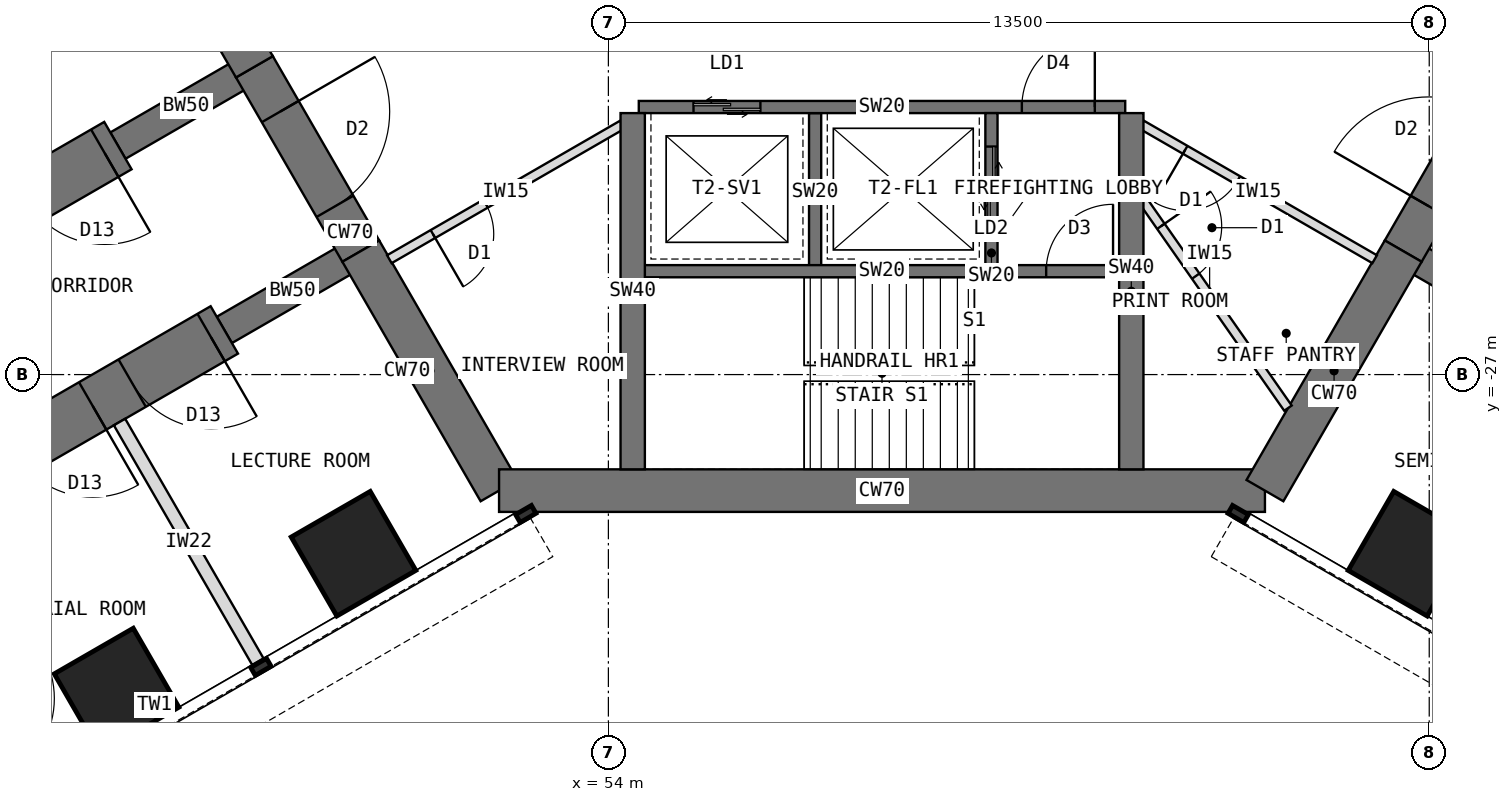
"""IFC4 building model, lengths in metres.
Left out: names, types, materials, properties, quantities, classifications, styles, units other than length and angle.
Written with IfcOpenShell. Run it as: python <this file> out.ifc"""

import sys

from ifc_helpers import new_model, si_unit, direction, frame, frame_2d, origin, origin_2d, place, context, subcontext, project, spatial, rectangle, extrude, element, fill, save


model = new_model("IFC4")
c1 = context("Model", 3, precision=1e-05, world=origin(), true_north=direction((0.0, 1.0)))
c2 = subcontext(c1, "Body", "Model", "MODEL_VIEW")
j1 = project(units=[si_unit("LENGTHUNIT", "METRE"), si_unit("PLANEANGLEUNIT", "RADIAN")], contexts=[c1])
p1 = place(None, origin())
s1 = spatial("IfcSite", under=j1, at=p1, CompositionType="ELEMENT")
p2 = place(p1, origin())
s2 = spatial("IfcBuilding", under=s1, at=p2, CompositionType="ELEMENT")
p3 = place(p2, frame((0.0, 0.0, 36.5)))
s3 = spatial("IfcBuildingStorey", under=s2, at=p3, CompositionType="ELEMENT", Elevation=36.5)
p4 = place(p3, frame((45.904, -18.0, 0.0), z_axis=(0.0, 0.0, 1.0), x_axis=(0.500024481964, -0.866011268655, 0.0)))
e1 = element("IfcWall", 1, at=p4, inside=s3, PredefinedType="SHEAR", context=c2, shape_type="SweptSolid", body=[
    extrude(rectangle(XDim=4.548, YDim=0.7, at=frame_2d((2.274, 0.0))), origin(), (0.0, 0.0, 1.0), 4.0),
])
p5 = place(p3, frame((48.178, -21.939, 0.0), z_axis=(0.0, 0.0, 1.0), x_axis=(0.500010275428, -0.866019471182, 0.0)))
e2 = element("IfcWall", 2, at=p5, inside=s3, PredefinedType="SHEAR", context=c2, shape_type="SweptSolid", body=[
    extrude(rectangle(XDim=3.5, YDim=0.7, at=frame_2d((1.75, 0.0))), origin(), (0.0, 0.0, 1.0), 4.0),
])
p6 = place(p5, frame((0.85, 0.0, 0.0)))
e3 = element("IfcOpeningElement", 3, at=p6, cuts=e2, PredefinedType="OPENING", context=c2, shape_type="SweptSolid", body=[
    extrude(rectangle(XDim=1.8, YDim=2.1, at=frame_2d((0.9, 1.05))), frame((0.0, 0.36, 0.0), z_axis=(0.0, -1.0, 0.0), x_axis=(1.0, 0.0, 0.0)), (0.0, 0.0, 1.0), 0.72),
])
p7 = place(p3, frame((49.928, -24.97, 0.0), z_axis=(0.0, 0.0, 1.0), x_axis=(0.499984222037, -0.866034513004, 0.0)))
e4 = element("IfcWall", 4, at=p7, inside=s3, PredefinedType="SHEAR", context=c2, shape_type="SweptSolid", body=[
    extrude(rectangle(XDim=4.548, YDim=0.7, at=frame_2d((2.274, 0.0))), origin(), (0.0, 0.0, 1.0), 4.0),
])
p8 = place(p3, frame((52.202, -28.908, 0.0), z_axis=(0.0, 0.0, 1.0), x_axis=(1.0, 0.0, 0.0)))
e5 = element("IfcWall", 5, at=p8, inside=s3, PredefinedType="SHEAR", context=c2, shape_type="SweptSolid", body=[
    extrude(rectangle(XDim=12.596, YDim=0.7, at=frame_2d((6.298, 0.0))), origin(), (0.0, 0.0, 1.0), 4.0),
])
p9 = place(p3, frame((64.798, -28.908, 0.0), z_axis=(0.0, 0.0, 1.0), x_axis=(0.499984222037, 0.866034513004, 0.0)))
e6 = element("IfcWall", 6, at=p9, inside=s3, PredefinedType="SHEAR", context=c2, shape_type="SweptSolid", body=[
    extrude(rectangle(XDim=4.548, YDim=0.7, at=frame_2d((2.274, 0.0))), origin(), (0.0, 0.0, 1.0), 4.0),
])
p10 = place(p3, frame((67.072, -24.97, 0.0), z_axis=(0.0, 0.0, 1.0), x_axis=(0.500010275428, 0.866019471182, 0.0)))
e7 = element("IfcWall", 7, at=p10, inside=s3, PredefinedType="SHEAR", context=c2, shape_type="SweptSolid", body=[
    extrude(rectangle(XDim=3.5, YDim=0.7, at=frame_2d((1.75, 0.0))), origin(), (0.0, 0.0, 1.0), 4.0),
])
p11 = place(p10, frame((0.85, 0.0, 0.0)))
e8 = element("IfcOpeningElement", 8, at=p11, cuts=e7, PredefinedType="OPENING", context=c2, shape_type="SweptSolid", body=[
    extrude(rectangle(XDim=1.8, YDim=2.1, at=frame_2d((0.9, 1.05))), frame((0.0, 0.36, 0.0), z_axis=(0.0, -1.0, 0.0), x_axis=(1.0, 0.0, 0.0)), (0.0, 0.0, 1.0), 0.72),
])
p12 = place(p3, frame((49.928, -24.97, 0.0), z_axis=(0.0, 0.0, 1.0), x_axis=(-0.866031863473, -0.499988811324, 0.0)))
e9 = element("IfcWall", 9, at=p12, inside=s3, PredefinedType="SHEAR", context=c2, shape_type="SweptSolid", body=[
    extrude(rectangle(XDim=2.592, YDim=0.5, at=frame_2d((1.296, 0.0))), origin(), (0.0, 0.0, 1.0), 4.0),
])
p13 = place(p3, frame((47.684, -26.266, 0.0), z_axis=(0.0, 0.0, 1.0), x_axis=(-0.866027579429, -0.499996231654, 0.0)))
e10 = element("IfcWall", 10, at=p13, inside=s3, PredefinedType="SHEAR", context=c2, shape_type="SweptSolid", body=[
    extrude(rectangle(XDim=13.2, YDim=0.9, at=frame_2d((6.6, 0.0))), origin(), (0.0, 0.0, 1.0), 4.0),
])
p14 = place(p13, frame((0.25, 0.0, 0.0)))
e11 = element("IfcOpeningElement", 11, at=p14, cuts=e10, PredefinedType="OPENING", context=c2, shape_type="SweptSolid", body=[
    extrude(rectangle(XDim=1.5, YDim=2.1, at=frame_2d((0.75, 1.05))), frame((0.0, 0.46, 0.0), z_axis=(0.0, -1.0, 0.0), x_axis=(1.0, 0.0, 0.0)), (0.0, 0.0, 1.0), 0.92),
])
p15 = place(p13, frame((2.5, 0.0, 0.0)))
e12 = element("IfcOpeningElement", 12, at=p15, cuts=e10, PredefinedType="OPENING", context=c2, shape_type="SweptSolid", body=[
    extrude(rectangle(XDim=1.5, YDim=2.1, at=frame_2d((0.75, 1.05))), frame((0.0, 0.46, 0.0), z_axis=(0.0, -1.0, 0.0), x_axis=(1.0, 0.0, 0.0)), (0.0, 0.0, 1.0), 0.92),
])
p16 = place(p3, frame((48.178, -21.939, 0.0), z_axis=(0.0, 0.0, 1.0), x_axis=(-0.866072649678, -0.499918158782, 0.0)))
e13 = element("IfcWall", 13, at=p16, inside=s3, PredefinedType="SHEAR", context=c2, shape_type="SweptSolid", body=[
    extrude(rectangle(XDim=2.592, YDim=0.5, at=frame_2d((1.296, 0.0))), origin(), (0.0, 0.0, 1.0), 4.0),
])
p17 = place(p3, frame((45.934, -23.234, 0.0), z_axis=(0.0, 0.0, 1.0), x_axis=(-0.866019570528, -0.500010103361, 0.0)))
e14 = element("IfcWall", 14, at=p17, inside=s3, PredefinedType="SHEAR", context=c2, shape_type="SweptSolid", body=[
    extrude(rectangle(XDim=13.2, YDim=0.9, at=frame_2d((6.6, 0.0))), origin(), (0.0, 0.0, 1.0), 4.0),
])
p18 = place(p17, frame((0.25, 0.0, 0.0)))
e15 = element("IfcOpeningElement", 15, at=p18, cuts=e14, PredefinedType="OPENING", context=c2, shape_type="SweptSolid", body=[
    extrude(rectangle(XDim=1.5, YDim=2.1, at=frame_2d((0.75, 1.05))), frame((0.0, 0.46, 0.0), z_axis=(0.0, -1.0, 0.0), x_axis=(1.0, 0.0, 0.0)), (0.0, 0.0, 1.0), 0.92),
])
p19 = place(p17, frame((2.5, 0.0, 0.0)))
e16 = element("IfcOpeningElement", 16, at=p19, cuts=e14, PredefinedType="OPENING", context=c2, shape_type="SweptSolid", body=[
    extrude(rectangle(XDim=1.5, YDim=2.1, at=frame_2d((0.75, 1.05))), frame((0.0, 0.46, 0.0), z_axis=(0.0, -1.0, 0.0), x_axis=(1.0, 0.0, 0.0)), (0.0, 0.0, 1.0), 0.92),
])
p20 = place(p3, frame((67.072, -24.97, 0.0), z_axis=(0.0, 0.0, 1.0), x_axis=(0.866031863473, -0.499988811324, 0.0)))
e17 = element("IfcWall", 17, at=p20, inside=s3, PredefinedType="SHEAR", context=c2, shape_type="SweptSolid", body=[
    extrude(rectangle(XDim=2.592, YDim=0.5, at=frame_2d((1.296, 0.0))), origin(), (0.0, 0.0, 1.0), 4.0),
])
for number, where, z_axis, x_axis in (
    (18, (49.809, -29.946, 0.0), (0.0, 0.0, 1.0), (0.866, 0.5, 0.0)),
    (19, (45.912, -32.196, 0.0), (0.0, 0.0, 1.0), (0.866, 0.5, 0.0)),
    (20, (67.191, -29.946, 0.0), (0.0, 0.0, 1.0), (0.5, 0.866, 0.0)),
):
    element("IfcColumn", number, at=place(p3, frame(where, z_axis=z_axis, x_axis=x_axis)), inside=s3, PredefinedType="COLUMN", context=c2, shape_type="SweptSolid", body=[
        extrude(rectangle(XDim=1.5, YDim=1.5, at=origin_2d()), origin(), (0.0, 0.0, 1.0), 4.0),
    ])
p21 = place(p3, frame((54.5, -22.6, 0.0), z_axis=(0.0, 0.0, 1.0), x_axis=(1.0, 0.0, 0.0)))
e21 = element("IfcWall", 21, at=p21, inside=s3, PredefinedType="SHEAR", context=c2, shape_type="SweptSolid", body=[
    extrude(rectangle(XDim=8.0, YDim=0.2, at=frame_2d((4.0, 0.0))), origin(), (0.0, 0.0, 1.0), 4.0),
])
p22 = place(p21, frame((6.3, 0.0, 0.0)))
e22 = element("IfcOpeningElement", 22, at=p22, cuts=e21, PredefinedType="OPENING", context=c2, shape_type="SweptSolid", body=[
    extrude(rectangle(XDim=1.2, YDim=2.1, at=frame_2d((0.6, 1.05))), frame((0.0, 0.11, 0.0), z_axis=(0.0, -1.0, 0.0), x_axis=(1.0, 0.0, 0.0)), (0.0, 0.0, 1.0), 0.22),
])
p23 = place(p21, frame((0.9, 0.0, 0.0)))
e23 = element("IfcOpeningElement", 23, at=p23, cuts=e21, PredefinedType="OPENING", context=c2, shape_type="SweptSolid", body=[
    extrude(rectangle(XDim=1.1, YDim=2.2, at=frame_2d((0.55, 1.1))), frame((0.0, 0.11, 0.0), z_axis=(0.0, -1.0, 0.0), x_axis=(1.0, 0.0, 0.0)), (0.0, 0.0, 1.0), 0.22),
])
p24 = place(p3, frame((57.4, -22.7, 0.0), z_axis=(0.0, 0.0, 1.0), x_axis=(0.0, -1.0, 0.0)))
e24 = element("IfcWall", 24, at=p24, inside=s3, PredefinedType="SHEAR", context=c2, shape_type="SweptSolid", body=[
    extrude(rectangle(XDim=2.6, YDim=0.2, at=frame_2d((1.3, 0.0))), origin(), (0.0, 0.0, 1.0), 4.0),
])
p25 = place(p3, frame((60.3, -22.7, 0.0), z_axis=(0.0, 0.0, 1.0), x_axis=(0.0, -1.0, 0.0)))
e25 = element("IfcWall", 25, at=p25, inside=s3, PredefinedType="SHEAR", context=c2, shape_type="SweptSolid", body=[
    extrude(rectangle(XDim=2.6, YDim=0.2, at=frame_2d((1.3, 0.0))), origin(), (0.0, 0.0, 1.0), 4.0),
])
p26 = place(p25, frame((0.55, 0.0, 0.0)))
e26 = element("IfcOpeningElement", 26, at=p26, cuts=e25, PredefinedType="OPENING", context=c2, shape_type="SweptSolid", body=[
    extrude(rectangle(XDim=1.3, YDim=2.2, at=frame_2d((0.65, 1.1))), frame((0.0, 0.11, 0.0), z_axis=(0.0, -1.0, 0.0), x_axis=(1.0, 0.0, 0.0)), (0.0, 0.0, 1.0), 0.22),
])
p27 = place(p3, frame((54.5, -25.3, 0.0), z_axis=(0.0, 0.0, 1.0), x_axis=(1.0, 0.0, 0.0)))
e27 = element("IfcWall", 27, at=p27, inside=s3, PredefinedType="SHEAR", context=c2, shape_type="SweptSolid", body=[
    extrude(rectangle(XDim=8.0, YDim=0.2, at=frame_2d((4.0, 0.0))), origin(), (0.0, 0.0, 1.0), 4.0),
])
p28 = place(p27, frame((6.7, 0.0, 0.0)))
e28 = element("IfcOpeningElement", 28, at=p28, cuts=e27, PredefinedType="OPENING", context=c2, shape_type="SweptSolid", body=[
    extrude(rectangle(XDim=1.1, YDim=2.1, at=frame_2d((0.55, 1.05))), frame((0.0, 0.11, 0.0), z_axis=(0.0, -1.0, 0.0), x_axis=(1.0, 0.0, 0.0)), (0.0, 0.0, 1.0), 0.22),
])
for number, where, z_axis, x_axis in (
    (29, (62.6, -22.7, 0.0), (0.0, 0.0, 1.0), (0.0, -1.0, 0.0)),
    (30, (54.4, -22.7, 0.0), (0.0, 0.0, 1.0), (0.0, -1.0, 0.0)),
):
    element("IfcWall", number, at=place(p3, frame(where, z_axis=z_axis, x_axis=x_axis)), inside=s3, PredefinedType="SHEAR", context=c2, shape_type="SweptSolid", body=[
        extrude(rectangle(XDim=5.858, YDim=0.4, at=frame_2d((2.929, 0.0))), origin(), (0.0, 0.0, 1.0), 4.0),
    ])
p29 = place(p3, frame((45.96, -27.78, 0.0), z_axis=(0.0, 0.0, 1.0), x_axis=(0.499982560684, -0.866035472144, 0.0)))
e31 = element("IfcWall", 31, at=p29, inside=s3, PredefinedType="PARTITIONING", context=c2, shape_type="SweptSolid", body=[
    extrude(rectangle(XDim=4.55, YDim=0.215, at=frame_2d((2.275, 0.0))), origin(), (0.0, 0.0, 1.0), 3.8),
])
p30 = place(p3, frame((66.603, -25.103, 0.0), z_axis=(0.0, 0.0, 1.0), x_axis=(-0.866021148949, 0.500007369519, 0.0)))
e32 = element("IfcWall", 32, at=p30, inside=s3, PredefinedType="PARTITIONING", context=c2, shape_type="SweptSolid", body=[
    extrude(rectangle(XDim=4.426, YDim=0.15, at=frame_2d((2.213, 0.0))), origin(), (0.0, 0.0, 1.0), 3.8),
])
p31 = place(p30, frame((2.598, 0.0, 0.0)))
e33 = element("IfcOpeningElement", 33, at=p31, cuts=e32, PredefinedType="OPENING", context=c2, shape_type="SweptSolid", body=[
    extrude(rectangle(XDim=1.0, YDim=2.1, at=frame_2d((0.5, 1.05))), frame((0.0, 0.085, 0.0), z_axis=(0.0, -1.0, 0.0), x_axis=(1.0, 0.0, 0.0)), (0.0, 0.0, 1.0), 0.17),
])
p32 = place(p3, frame((54.23, -22.89, 0.0), z_axis=(0.0, 0.0, 1.0), x_axis=(-0.866021148949, -0.500007369519, 0.0)))
e34 = element("IfcWall", 34, at=p32, inside=s3, PredefinedType="PARTITIONING", context=c2, shape_type="SweptSolid", body=[
    extrude(rectangle(XDim=4.426, YDim=0.15, at=frame_2d((2.213, 0.0))), origin(), (0.0, 0.0, 1.0), 3.8),
])
p33 = place(p32, frame((2.598, 0.0, 0.0)))
e35 = element("IfcOpeningElement", 35, at=p33, cuts=e34, PredefinedType="OPENING", context=c2, shape_type="SweptSolid", body=[
    extrude(rectangle(XDim=1.0, YDim=2.1, at=frame_2d((0.5, 1.05))), frame((0.0, 0.085, 0.0), z_axis=(0.0, -1.0, 0.0), x_axis=(1.0, 0.0, 0.0)), (0.0, 0.0, 1.0), 0.17),
])
p34 = place(p3, frame((62.6, -23.865, 0.0), z_axis=(0.0, 0.0, 1.0), x_axis=(0.572915783016, -0.819614241928, 0.0)))
e36 = element("IfcWall", 36, at=p34, inside=s3, PredefinedType="PARTITIONING", context=c2, shape_type="SweptSolid", body=[
    extrude(rectangle(XDim=4.498, YDim=0.15, at=frame_2d((2.249, 0.0))), origin(), (0.0, 0.0, 1.0), 3.8),
])
p35 = place(p34, frame((0.849, 0.0, 0.0)))
e37 = element("IfcOpeningElement", 37, at=p35, cuts=e36, PredefinedType="OPENING", context=c2, shape_type="SweptSolid", body=[
    extrude(rectangle(XDim=1.0, YDim=2.1, at=frame_2d((0.5, 1.05))), frame((0.0, 0.085, 0.0), z_axis=(0.0, -1.0, 0.0), x_axis=(1.0, 0.0, 0.0)), (0.0, 0.0, 1.0), 0.17),
])
p36 = place(p22, origin())
e38 = element("IfcDoor", 38, at=p36, inside=s3, OperationType="SINGLE_SWING_RIGHT", PredefinedType="DOOR", context=c2, shape_type="SweptSolid", body=[
    extrude(rectangle(XDim=1.2, YDim=2.1, at=frame_2d((0.6, 1.05))), frame((0.0, 0.025, 0.0), z_axis=(0.0, -1.0, 0.0), x_axis=(1.0, 0.0, 0.0)), (0.0, 0.0, 1.0), 0.05),
])
fill(e22, e38)
p37 = place(p26, origin())
e39 = element("IfcDoor", 39, at=p37, inside=s3, OperationType="DOUBLE_DOOR_SLIDING", PredefinedType="DOOR", context=c2, shape_type="SweptSolid", body=[
    extrude(rectangle(XDim=1.3, YDim=2.2, at=frame_2d((0.65, 1.1))), frame((0.0, 0.025, 0.0), z_axis=(0.0, -1.0, 0.0), x_axis=(1.0, 0.0, 0.0)), (0.0, 0.0, 1.0), 0.05),
])
fill(e26, e39)
p38 = place(p23, origin())
e40 = element("IfcDoor", 40, at=p38, inside=s3, OperationType="DOUBLE_DOOR_SLIDING", PredefinedType="DOOR", context=c2, shape_type="SweptSolid", body=[
    extrude(rectangle(XDim=1.1, YDim=2.2, at=frame_2d((0.55, 1.1))), frame((0.0, 0.025, 0.0), z_axis=(0.0, -1.0, 0.0), x_axis=(1.0, 0.0, 0.0)), (0.0, 0.0, 1.0), 0.05),
])
fill(e23, e40)
p39 = place(p28, origin())
e41 = element("IfcDoor", 41, at=p39, inside=s3, OperationType="SINGLE_SWING_RIGHT", PredefinedType="DOOR", context=c2, shape_type="SweptSolid", body=[
    extrude(rectangle(XDim=1.1, YDim=2.1, at=frame_2d((0.55, 1.05))), frame((0.0, 0.025, 0.0), z_axis=(0.0, -1.0, 0.0), x_axis=(1.0, 0.0, 0.0)), (0.0, 0.0, 1.0), 0.05),
])
fill(e28, e41)
p40 = place(p6, origin())
e42 = element("IfcDoor", 42, at=p40, inside=s3, OperationType="DOUBLE_DOOR_DOUBLE_SWING", PredefinedType="DOOR", context=c2, shape_type="SweptSolid", body=[
    extrude(rectangle(XDim=1.72, YDim=2.06, at=frame_2d((0.9, 1.03))), frame((0.0, 0.025, 0.0), z_axis=(0.0, -1.0, 0.0), x_axis=(1.0, 0.0, 0.0)), (0.0, 0.0, 1.0), 0.05),
    extrude(rectangle(XDim=0.04, YDim=2.1, at=frame_2d((0.02, 1.05))), frame((0.0, 0.35, 0.0), z_axis=(0.0, -1.0, 0.0), x_axis=(1.0, 0.0, 0.0)), (0.0, 0.0, 1.0), 0.699),
    extrude(rectangle(XDim=0.04, YDim=2.1, at=frame_2d((1.78, 1.05))), frame((0.0, 0.35, 0.0), z_axis=(0.0, -1.0, 0.0), x_axis=(1.0, 0.0, 0.0)), (0.0, 0.0, 1.0), 0.699),
    extrude(rectangle(XDim=1.72, YDim=0.04, at=frame_2d((0.9, 2.08))), frame((0.0, 0.35, 0.0), z_axis=(0.0, -1.0, 0.0), x_axis=(1.0, 0.0, 0.0)), (0.0, 0.0, 1.0), 0.699),
])
fill(e3, e42)
p41 = place(p11, origin())
e43 = element("IfcDoor", 43, at=p41, inside=s3, OperationType="DOUBLE_DOOR_DOUBLE_SWING", PredefinedType="DOOR", context=c2, shape_type="SweptSolid", body=[
    extrude(rectangle(XDim=1.72, YDim=2.06, at=frame_2d((0.9, 1.03))), frame((0.0, 0.025, 0.0), z_axis=(0.0, -1.0, 0.0), x_axis=(1.0, 0.0, 0.0)), (0.0, 0.0, 1.0), 0.05),
    extrude(rectangle(XDim=0.04, YDim=2.1, at=frame_2d((0.02, 1.05))), frame((0.0, 0.35, 0.0), z_axis=(0.0, -1.0, 0.0), x_axis=(1.0, 0.0, 0.0)), (0.0, 0.0, 1.0), 0.699),
    extrude(rectangle(XDim=0.04, YDim=2.1, at=frame_2d((1.78, 1.05))), frame((0.0, 0.35, 0.0), z_axis=(0.0, -1.0, 0.0), x_axis=(1.0, 0.0, 0.0)), (0.0, 0.0, 1.0), 0.699),
    extrude(rectangle(XDim=1.72, YDim=0.04, at=frame_2d((0.9, 2.08))), frame((0.0, 0.35, 0.0), z_axis=(0.0, -1.0, 0.0), x_axis=(1.0, 0.0, 0.0)), (0.0, 0.0, 1.0), 0.699),
])
fill(e8, e43)
p42 = place(p33, origin())
e44 = element("IfcDoor", 44, at=p42, inside=s3, OperationType="SINGLE_SWING_RIGHT", PredefinedType="DOOR", context=c2, shape_type="SweptSolid", body=[
    extrude(rectangle(XDim=1.0, YDim=2.1, at=frame_2d((0.5, 1.05))), frame((0.0, 0.025, 0.0), z_axis=(0.0, -1.0, 0.0), x_axis=(1.0, 0.0, 0.0)), (0.0, 0.0, 1.0), 0.05),
])
fill(e35, e44)
p43 = place(p35, origin())
e45 = element("IfcDoor", 45, at=p43, inside=s3, OperationType="SINGLE_SWING_LEFT", PredefinedType="DOOR", context=c2, shape_type="SweptSolid", body=[
    extrude(rectangle(XDim=1.0, YDim=2.1, at=frame_2d((0.5, 1.05))), frame((0.0, 0.025, 0.0), z_axis=(0.0, -1.0, 0.0), x_axis=(1.0, 0.0, 0.0)), (0.0, 0.0, 1.0), 0.05),
])
fill(e37, e45)
p44 = place(p31, origin())
e46 = element("IfcDoor", 46, at=p44, inside=s3, OperationType="SINGLE_SWING_RIGHT", PredefinedType="DOOR", context=c2, shape_type="SweptSolid", body=[
    extrude(rectangle(XDim=1.0, YDim=2.1, at=frame_2d((0.5, 1.05))), frame((0.0, 0.025, 0.0), z_axis=(0.0, -1.0, 0.0), x_axis=(1.0, 0.0, 0.0)), (0.0, 0.0, 1.0), 0.05),
])
fill(e33, e46)
p45 = place(p14, origin())
e47 = element("IfcDoor", 47, at=p45, inside=s3, OperationType="DOUBLE_DOOR_SINGLE_SWING", PredefinedType="DOOR", context=c2, shape_type="SweptSolid", body=[
    extrude(rectangle(XDim=1.42, YDim=2.06, at=frame_2d((0.75, 1.03))), frame((0.0, 0.025, 0.0), z_axis=(0.0, -1.0, 0.0), x_axis=(1.0, 0.0, 0.0)), (0.0, 0.0, 1.0), 0.05),
    extrude(rectangle(XDim=0.04, YDim=2.1, at=frame_2d((0.02, 1.05))), frame((0.0, 0.45, 0.0), z_axis=(0.0, -1.0, 0.0), x_axis=(1.0, 0.0, 0.0)), (0.0, 0.0, 1.0), 0.899),
    extrude(rectangle(XDim=0.04, YDim=2.1, at=frame_2d((1.48, 1.05))), frame((0.0, 0.45, 0.0), z_axis=(0.0, -1.0, 0.0), x_axis=(1.0, 0.0, 0.0)), (0.0, 0.0, 1.0), 0.899),
    extrude(rectangle(XDim=1.42, YDim=0.04, at=frame_2d((0.75, 2.08))), frame((0.0, 0.45, 0.0), z_axis=(0.0, -1.0, 0.0), x_axis=(1.0, 0.0, 0.0)), (0.0, 0.0, 1.0), 0.899),
])
fill(e11, e47)
p46 = place(p15, origin())
e48 = element("IfcDoor", 48, at=p46, inside=s3, OperationType="DOUBLE_DOOR_SINGLE_SWING", PredefinedType="DOOR", context=c2, shape_type="SweptSolid", body=[
    extrude(rectangle(XDim=1.42, YDim=2.06, at=frame_2d((0.75, 1.03))), frame((0.0, 0.025, 0.0), z_axis=(0.0, -1.0, 0.0), x_axis=(1.0, 0.0, 0.0)), (0.0, 0.0, 1.0), 0.05),
    extrude(rectangle(XDim=0.04, YDim=2.1, at=frame_2d((0.02, 1.05))), frame((0.0, 0.45, 0.0), z_axis=(0.0, -1.0, 0.0), x_axis=(1.0, 0.0, 0.0)), (0.0, 0.0, 1.0), 0.899),
    extrude(rectangle(XDim=0.04, YDim=2.1, at=frame_2d((1.48, 1.05))), frame((0.0, 0.45, 0.0), z_axis=(0.0, -1.0, 0.0), x_axis=(1.0, 0.0, 0.0)), (0.0, 0.0, 1.0), 0.899),
    extrude(rectangle(XDim=1.42, YDim=0.04, at=frame_2d((0.75, 2.08))), frame((0.0, 0.45, 0.0), z_axis=(0.0, -1.0, 0.0), x_axis=(1.0, 0.0, 0.0)), (0.0, 0.0, 1.0), 0.899),
])
fill(e12, e48)
p47 = place(p18, origin())
e49 = element("IfcDoor", 49, at=p47, inside=s3, OperationType="DOUBLE_DOOR_SINGLE_SWING", PredefinedType="DOOR", context=c2, shape_type="SweptSolid", body=[
    extrude(rectangle(XDim=1.42, YDim=2.06, at=frame_2d((0.75, 1.03))), frame((0.0, 0.025, 0.0), z_axis=(0.0, -1.0, 0.0), x_axis=(1.0, 0.0, 0.0)), (0.0, 0.0, 1.0), 0.05),
    extrude(rectangle(XDim=0.04, YDim=2.1, at=frame_2d((0.02, 1.05))), frame((0.0, 0.45, 0.0), z_axis=(0.0, -1.0, 0.0), x_axis=(1.0, 0.0, 0.0)), (0.0, 0.0, 1.0), 0.899),
    extrude(rectangle(XDim=0.04, YDim=2.1, at=frame_2d((1.48, 1.05))), frame((0.0, 0.45, 0.0), z_axis=(0.0, -1.0, 0.0), x_axis=(1.0, 0.0, 0.0)), (0.0, 0.0, 1.0), 0.899),
    extrude(rectangle(XDim=1.42, YDim=0.04, at=frame_2d((0.75, 2.08))), frame((0.0, 0.45, 0.0), z_axis=(0.0, -1.0, 0.0), x_axis=(1.0, 0.0, 0.0)), (0.0, 0.0, 1.0), 0.899),
])
fill(e15, e49)
save(model, sys.argv[1])
